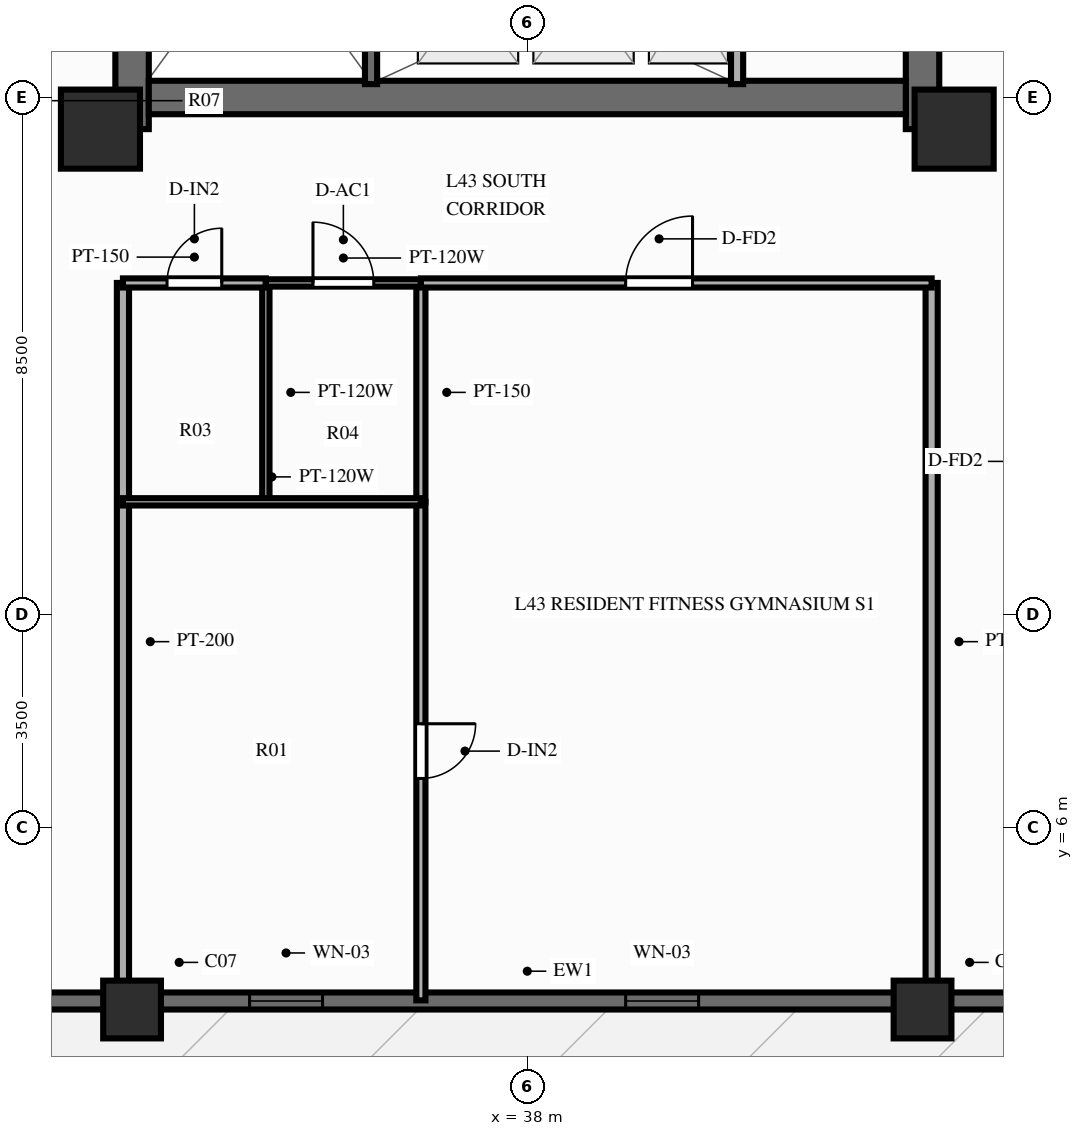
"""IFC4 building model, lengths in metres.
Left out: names, types, materials, properties, quantities, classifications, styles, units other than length and angle.
Written with IfcOpenShell. Run it as: python <this file> out.ifc"""

import sys

from ifc_helpers import new_model, si_unit, direction, frame, frame_2d, origin, origin_2d, place, context, subcontext, project, spatial, rectangle, extrude, source, transform, mapped, element, fill, save


model = new_model("IFC4")
c1 = context("Model", 3, precision=1e-05, world=origin(), true_north=direction((0.0, 1.0)))
c2 = subcontext(c1, "Body", "Model", "MODEL_VIEW")
j1 = project(units=[si_unit("LENGTHUNIT", "METRE"), si_unit("PLANEANGLEUNIT", "RADIAN")], contexts=[c1])
p1 = place(None, origin())
s1 = spatial("IfcSite", under=j1, at=p1, CompositionType="ELEMENT")
p2 = place(p1, origin())
s2 = spatial("IfcBuilding", under=s1, at=p2, CompositionType="ELEMENT")
p3 = place(p2, frame((0.0, 0.0, 135.75)))
s3 = spatial("IfcBuildingStorey", under=s2, at=p3, CompositionType="ELEMENT", Elevation=135.75)
p4 = place(p3, frame((31.5, 17.48, 0.0), z_axis=(0.0, 0.0, 1.0), x_axis=(0.0, 1.0, 0.0)))
e1 = element("IfcWall", 1, at=p4, inside=s3, PredefinedType="SHEAR", context=c2, shape_type="SweptSolid", body=[
    extrude(rectangle(XDim=19.04, YDim=0.55, at=frame_2d((9.52, 0.0))), origin(), (0.0, 0.0, 1.0), 3.0),
])
p5 = place(p4, frame((6.32, 0.0, 0.0)))
e2 = element("IfcOpeningElement", 2, at=p5, cuts=e1, PredefinedType="OPENING", context=c2, shape_type="SweptSolid", body=[
    extrude(rectangle(XDim=1.1, YDim=2.15, at=frame_2d((0.55, 1.075))), frame((0.0, 0.287, 0.0), z_axis=(0.0, -1.0, 0.0), x_axis=(1.0, 0.0, 0.0)), (0.0, 0.0, 1.0), 0.574),
])
p6 = place(p3, frame((44.5, 17.48, 0.0), z_axis=(0.0, 0.0, 1.0), x_axis=(0.0, 1.0, 0.0)))
e3 = element("IfcWall", 3, at=p6, inside=s3, PredefinedType="SHEAR", context=c2, shape_type="SweptSolid", body=[
    extrude(rectangle(XDim=19.04, YDim=0.55, at=frame_2d((9.52, 0.0))), origin(), (0.0, 0.0, 1.0), 3.0),
])
p7 = place(p6, frame((12.67, 0.0, 0.0), z_axis=(0.0, 0.0, 1.0), x_axis=(-1.0, 0.0, 0.0)))
e4 = element("IfcOpeningElement", 4, at=p7, cuts=e3, PredefinedType="OPENING", context=c2, shape_type="SweptSolid", body=[
    extrude(rectangle(XDim=1.1, YDim=2.15, at=frame_2d((0.55, 1.075))), frame((0.0, 0.287, 0.0), z_axis=(0.0, -1.0, 0.0), x_axis=(1.0, 0.0, 0.0)), (0.0, 0.0, 1.0), 0.574),
])
p8 = place(p3, frame((31.775, 18.0, 0.0), z_axis=(0.0, 0.0, 1.0), x_axis=(1.0, 0.0, 0.0)))
e5 = element("IfcWall", 5, at=p8, inside=s3, PredefinedType="SHEAR", context=c2, shape_type="SweptSolid", body=[
    extrude(rectangle(XDim=12.45, YDim=0.55, at=frame_2d((6.225, 0.0))), origin(), (0.0, 0.0, 1.0), 3.0),
])
m1 = source(origin(), c2, "Body", "SweptSolid", [
    extrude(rectangle(XDim=1.3, YDim=1.3, at=origin_2d()), origin(), (0.0, 0.0, 1.0), 3.0),
])
for number, where, z_axis, x_axis in (
    (6, (30.98, 17.48, 0.0), (0.0, 0.0, 1.0), (1.0, 0.0, 0.0)),
    (7, (45.02, 17.48, 0.0), (0.0, 0.0, 1.0), (1.0, 0.0, 0.0)),
):
    element("IfcColumn", number, at=place(p3, frame(where, z_axis=z_axis, x_axis=x_axis)), inside=s3, PredefinedType="COLUMN", context=c2, shape_type="MappedRepresentation", body=[
        mapped(m1, transform((0.0, 0.0, 0.0), scale=1.0)),
    ])
m2 = source(origin(), c2, "Body", "SweptSolid", [
    extrude(rectangle(XDim=0.95, YDim=0.95, at=origin_2d()), origin(), (0.0, 0.0, 1.0), 3.0),
])
for number, where, z_axis, x_axis in (
    (8, (31.5, 3.0, 0.0), (0.0, 0.0, 1.0), (1.0, 0.0, 0.0)),
    (9, (44.5, 3.0, 0.0), (0.0, 0.0, 1.0), (1.0, 0.0, 0.0)),
):
    element("IfcColumn", number, at=place(p3, frame(where, z_axis=z_axis, x_axis=x_axis)), inside=s3, PredefinedType="COLUMN", context=c2, shape_type="MappedRepresentation", body=[
        mapped(m2, transform((0.0, 0.0, 0.0), scale=1.0)),
    ])
p9 = place(p3, frame((16.2, 3.14, 0.0), z_axis=(0.0, 0.0, 1.0), x_axis=(1.0, 0.0, 0.0)))
e10 = element("IfcWall", 10, at=p9, inside=s3, PredefinedType="SOLIDWALL", context=c2, shape_type="SweptSolid", body=[
    extrude(rectangle(XDim=43.6, YDim=0.28, at=frame_2d((21.8, 0.0))), origin(), (0.0, 0.0, 1.0), 2.28),
])
p10 = place(p9, frame((8.2, 0.0, 0.0), z_axis=(0.0, 0.0, 1.0), x_axis=(-1.0, 0.0, 0.0)))
e11 = element("IfcOpeningElement", 11, at=p10, cuts=e10, PredefinedType="OPENING", context=c2, shape_type="SweptSolid", body=[
    extrude(rectangle(XDim=1.1, YDim=2.15, at=frame_2d((0.55, 1.075))), frame((0.0, 0.152, 0.0), z_axis=(0.0, -1.0, 0.0), x_axis=(1.0, 0.0, 0.0)), (0.0, 0.0, 1.0), 0.304),
])
p11 = place(p9, frame((17.232, 0.0, 0.25)))
e12 = element("IfcOpeningElement", 12, at=p11, cuts=e10, PredefinedType="OPENING", context=c2, shape_type="SweptSolid", body=[
    extrude(rectangle(XDim=1.2, YDim=1.5, at=frame_2d((0.6, 0.75))), frame((0.0, 0.152, 0.0), z_axis=(0.0, -1.0, 0.0), x_axis=(1.0, 0.0, 0.0)), (0.0, 0.0, 1.0), 0.304),
])
p12 = place(p9, frame((23.417, 0.0, 0.25)))
e13 = element("IfcOpeningElement", 13, at=p12, cuts=e10, PredefinedType="OPENING", context=c2, shape_type="SweptSolid", body=[
    extrude(rectangle(XDim=1.2, YDim=1.5, at=frame_2d((0.6, 0.75))), frame((0.0, 0.152, 0.0), z_axis=(0.0, -1.0, 0.0), x_axis=(1.0, 0.0, 0.0)), (0.0, 0.0, 1.0), 0.304),
])
p13 = place(p9, frame((35.35, 0.0, 0.25)))
e14 = element("IfcOpeningElement", 14, at=p13, cuts=e10, PredefinedType="OPENING", context=c2, shape_type="SweptSolid", body=[
    extrude(rectangle(XDim=1.2, YDim=1.5, at=frame_2d((0.6, 0.75))), frame((0.0, 0.152, 0.0), z_axis=(0.0, -1.0, 0.0), x_axis=(1.0, 0.0, 0.0)), (0.0, 0.0, 1.0), 0.304),
])
p14 = place(p3, frame((41.45, 18.22, 0.0), z_axis=(0.0, 0.0, 1.0), x_axis=(0.0, 1.0, 0.0)))
e15 = element("IfcWall", 15, at=p14, inside=s3, PredefinedType="PARTITIONING", context=c2, shape_type="SweptSolid", body=[
    extrude(rectangle(XDim=2.96, YDim=0.2, at=frame_2d((1.48, 0.0))), origin(), (0.0, 0.0, 1.0), 2.79),
])
p15 = place(p3, frame((35.43, 18.22, 0.0), z_axis=(0.0, 0.0, 1.0), x_axis=(0.0, 1.0, 0.0)))
e16 = element("IfcWall", 16, at=p15, inside=s3, PredefinedType="SOLIDWALL", context=c2, shape_type="SweptSolid", body=[
    extrude(rectangle(XDim=7.22, YDim=0.2, at=frame_2d((3.61, 0.0))), origin(), (0.0, 0.0, 1.0), 2.79),
])
p16 = place(p15, frame((6.68, 0.0, 0.0), z_axis=(0.0, 0.0, 1.0), x_axis=(-1.0, 0.0, 0.0)))
e17 = element("IfcOpeningElement", 17, at=p16, cuts=e16, PredefinedType="OPENING", context=c2, shape_type="SweptSolid", body=[
    extrude(rectangle(XDim=1.1, YDim=2.15, at=frame_2d((0.55, 1.075))), frame((0.0, 0.112, 0.0), z_axis=(0.0, -1.0, 0.0), x_axis=(1.0, 0.0, 0.0)), (0.0, 0.0, 1.0), 0.224),
])
for number, where, z_axis, x_axis in (
    (18, (31.35, 14.95, 0.0), (0.0, 0.0, 1.0), (0.0, -1.0, 0.0)),
    (19, (44.65, 14.95, 0.0), (0.0, 0.0, 1.0), (0.0, -1.0, 0.0)),
):
    element("IfcWall", number, at=place(p3, frame(where, z_axis=z_axis, x_axis=x_axis)), inside=s3, PredefinedType="PARTITIONING", context=c2, shape_type="SweptSolid", body=[
        extrude(rectangle(XDim=11.8, YDim=0.2, at=frame_2d((5.9, 0.0))), origin(), (0.0, 0.0, 1.0), 2.34),
    ])
p17 = place(p3, frame((33.7, 14.95, 0.0), z_axis=(0.0, 0.0, 1.0), x_axis=(0.0, -1.0, 0.0)))
e20 = element("IfcWall", 20, at=p17, inside=s3, PredefinedType="PARTITIONING", context=c2, shape_type="SweptSolid", body=[
    extrude(rectangle(XDim=3.6, YDim=0.12, at=frame_2d((1.8, 0.0))), origin(), (0.0, 0.0, 1.0), 2.79),
])
p18 = place(p3, frame((36.25, 14.95, 0.0), z_axis=(0.0, 0.0, 1.0), x_axis=(0.0, -1.0, 0.0)))
e21 = element("IfcWall", 21, at=p18, inside=s3, PredefinedType="PARTITIONING", context=c2, shape_type="SweptSolid", body=[
    extrude(rectangle(XDim=3.6, YDim=0.15, at=frame_2d((1.8, 0.0))), origin(), (0.0, 0.0, 1.0), 2.79),
])
p19 = place(p3, frame((36.25, 11.35, 0.0), z_axis=(0.0, 0.0, 1.0), x_axis=(0.0, -1.0, 0.0)))
e22 = element("IfcWall", 22, at=p19, inside=s3, PredefinedType="PARTITIONING", context=c2, shape_type="SweptSolid", body=[
    extrude(rectangle(XDim=8.2, YDim=0.15, at=frame_2d((4.1, 0.0))), origin(), (0.0, 0.0, 1.0), 2.79),
])
p20 = place(p19, frame((3.65, 0.0, 0.0)))
e23 = element("IfcOpeningElement", 23, at=p20, cuts=e22, PredefinedType="OPENING", context=c2, shape_type="SweptSolid", body=[
    extrude(rectangle(XDim=0.9, YDim=2.1, at=frame_2d((0.45, 1.05))), frame((0.0, 0.087, 0.0), z_axis=(0.0, -1.0, 0.0), x_axis=(1.0, 0.0, 0.0)), (0.0, 0.0, 1.0), 0.174),
])
p21 = place(p3, frame((31.35, 11.35, 0.0), z_axis=(0.0, 0.0, 1.0), x_axis=(1.0, 0.0, 0.0)))
e24 = element("IfcWall", 24, at=p21, inside=s3, PredefinedType="PARTITIONING", context=c2, shape_type="SweptSolid", body=[
    extrude(rectangle(XDim=4.9, YDim=0.12, at=frame_2d((2.45, 0.0))), origin(), (0.0, 0.0, 1.0), 2.79),
])
p22 = place(p3, frame((31.35, 14.95, 0.0), z_axis=(0.0, 0.0, 1.0), x_axis=(1.0, 0.0, 0.0)))
e25 = element("IfcWall", 25, at=p22, inside=s3, PredefinedType="PARTITIONING", context=c2, shape_type="SweptSolid", body=[
    extrude(rectangle(XDim=2.35, YDim=0.15, at=frame_2d((1.175, 0.0))), origin(), (0.0, 0.0, 1.0), 2.79),
])
p23 = place(p22, frame((0.725, 0.0, 0.0)))
e26 = element("IfcOpeningElement", 26, at=p23, cuts=e25, PredefinedType="OPENING", context=c2, shape_type="SweptSolid", body=[
    extrude(rectangle(XDim=0.9, YDim=2.1, at=frame_2d((0.45, 1.05))), frame((0.0, 0.087, 0.0), z_axis=(0.0, -1.0, 0.0), x_axis=(1.0, 0.0, 0.0)), (0.0, 0.0, 1.0), 0.174),
])
p24 = place(p3, frame((33.7, 14.95, 0.0), z_axis=(0.0, 0.0, 1.0), x_axis=(1.0, 0.0, 0.0)))
e27 = element("IfcWall", 27, at=p24, inside=s3, PredefinedType="PARTITIONING", context=c2, shape_type="SweptSolid", body=[
    extrude(rectangle(XDim=2.55, YDim=0.12, at=frame_2d((1.275, 0.0))), origin(), (0.0, 0.0, 1.0), 2.79),
])
p25 = place(p24, frame((0.775, 0.0, 0.0)))
e28 = element("IfcOpeningElement", 28, at=p25, cuts=e27, PredefinedType="OPENING", context=c2, shape_type="SweptSolid", body=[
    extrude(rectangle(XDim=1.0, YDim=2.1, at=frame_2d((0.5, 1.05))), frame((0.0, 0.072, 0.0), z_axis=(0.0, -1.0, 0.0), x_axis=(1.0, 0.0, 0.0)), (0.0, 0.0, 1.0), 0.144),
])
p26 = place(p3, frame((36.25, 14.95, 0.0), z_axis=(0.0, 0.0, 1.0), x_axis=(1.0, 0.0, 0.0)))
e29 = element("IfcWall", 29, at=p26, inside=s3, PredefinedType="PARTITIONING", context=c2, shape_type="SweptSolid", body=[
    extrude(rectangle(XDim=8.4, YDim=0.15, at=frame_2d((4.2, 0.0))), origin(), (0.0, 0.0, 1.0), 2.79),
])
p27 = place(p26, frame((3.367, 0.0, 0.0)))
e30 = element("IfcOpeningElement", 30, at=p27, cuts=e29, PredefinedType="OPENING", context=c2, shape_type="SweptSolid", body=[
    extrude(rectangle(XDim=1.1, YDim=2.15, at=frame_2d((0.55, 1.075))), frame((0.0, 0.087, 0.0), z_axis=(0.0, -1.0, 0.0), x_axis=(1.0, 0.0, 0.0)), (0.0, 0.0, 1.0), 0.174),
])
m3 = source(origin(), c2, "Body", "SweptSolid", [
    extrude(rectangle(XDim=1.2, YDim=1.5, at=frame_2d((0.6, 0.75))), frame((0.0, 0.03, 0.0), z_axis=(0.0, -1.0, 0.0), x_axis=(1.0, 0.0, 0.0)), (0.0, 0.0, 1.0), 0.06),
])
p28 = place(p11, origin())
e31 = element("IfcWindow", 31, at=p28, inside=s3, PartitioningType="SINGLE_PANEL", PredefinedType="WINDOW", context=c2, shape_type="MappedRepresentation", body=[
    mapped(m3, transform((0.0, 0.0, 0.0), scale=1.0)),
])
fill(e12, e31)
p29 = place(p12, origin())
e32 = element("IfcWindow", 32, at=p29, inside=s3, PartitioningType="SINGLE_PANEL", PredefinedType="WINDOW", context=c2, shape_type="MappedRepresentation", body=[
    mapped(m3, transform((0.0, 0.0, 0.0), scale=1.0)),
])
fill(e13, e32)
m4 = source(origin(), c2, "Body", "SweptSolid", [
    extrude(rectangle(XDim=0.9, YDim=2.1, at=frame_2d((0.45, 1.05))), frame((0.0, 0.025, 0.0), z_axis=(0.0, -1.0, 0.0), x_axis=(1.0, 0.0, 0.0)), (0.0, 0.0, 1.0), 0.05),
])
p30 = place(p20, origin())
e33 = element("IfcDoor", 33, at=p30, inside=s3, OperationType="SINGLE_SWING_LEFT", PredefinedType="DOOR", context=c2, shape_type="MappedRepresentation", body=[
    mapped(m4, transform((0.0, 0.0, 0.0), scale=1.0)),
])
fill(e23, e33)
p31 = place(p23, origin())
e34 = element("IfcDoor", 34, at=p31, inside=s3, OperationType="SINGLE_SWING_RIGHT", PredefinedType="DOOR", context=c2, shape_type="MappedRepresentation", body=[
    mapped(m4, transform((0.0, 0.0, 0.0), scale=1.0)),
])
fill(e26, e34)
m5 = source(origin(), c2, "Body", "SweptSolid", [
    extrude(rectangle(XDim=1.0, YDim=2.1, at=frame_2d((0.5, 1.05))), frame((0.0, 0.025, 0.0), z_axis=(0.0, -1.0, 0.0), x_axis=(1.0, 0.0, 0.0)), (0.0, 0.0, 1.0), 0.05),
])
p32 = place(p25, origin())
e35 = element("IfcDoor", 35, at=p32, inside=s3, OperationType="SINGLE_SWING_LEFT", PredefinedType="DOOR", context=c2, shape_type="MappedRepresentation", body=[
    mapped(m5, transform((0.0, 0.0, 0.0), scale=1.0)),
])
fill(e28, e35)
m6 = source(origin(), c2, "Body", "SweptSolid", [
    extrude(rectangle(XDim=1.1, YDim=2.15, at=frame_2d((0.55, 1.075))), frame((0.0, 0.025, 0.0), z_axis=(0.0, -1.0, 0.0), x_axis=(1.0, 0.0, 0.0)), (0.0, 0.0, 1.0), 0.05),
])
p33 = place(p27, origin())
e36 = element("IfcDoor", 36, at=p33, inside=s3, OperationType="SINGLE_SWING_RIGHT", PredefinedType="DOOR", context=c2, shape_type="MappedRepresentation", body=[
    mapped(m6, transform((0.0, 0.0, 0.0), scale=1.0)),
])
fill(e30, e36)
save(model, sys.argv[1])
